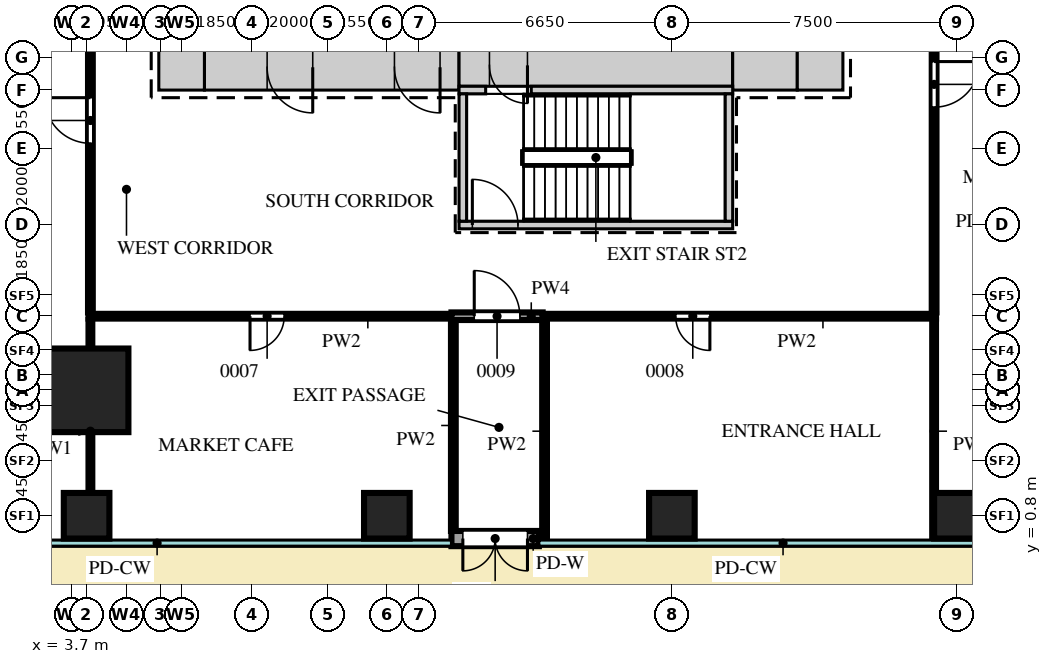
"""IFC4 building model, lengths in metres.
Left out: names, types, materials, properties, quantities, classifications, styles, units other than length and angle.
Written with IfcOpenShell. Run it as: python <this file> out.ifc"""

import sys

from ifc_helpers import new_model, si_unit, direction, frame, frame_2d, origin, origin_2d, place, context, subcontext, project, spatial, rectangle, extrude, source, transform, mapped, element, fill, save


model = new_model("IFC4")
c1 = context("Model", 3, precision=1e-05, world=origin(), true_north=direction((0.0, 1.0)))
c2 = subcontext(c1, "Body", "Model", "MODEL_VIEW")
j1 = project(units=[si_unit("LENGTHUNIT", "METRE"), si_unit("PLANEANGLEUNIT", "RADIAN")], contexts=[c1])
p1 = place(None, origin())
s1 = spatial("IfcSite", under=j1, at=p1, CompositionType="ELEMENT")
p2 = place(p1, origin())
s2 = spatial("IfcBuilding", under=s1, at=p2, CompositionType="ELEMENT")
p3 = place(p2, origin())
s3 = spatial("IfcBuildingStorey", under=s2, at=p3, CompositionType="ELEMENT", Elevation=0.0)
m1 = source(origin(), c2, "Body", "SweptSolid", [
    extrude(rectangle(XDim=6.7, YDim=1.2, at=frame_2d((3.35, 0.0))), origin(), (0.0, 0.0, 1.0), 7.2),
])
p4 = place(p3, frame((7.2, 12.6, 0.0), z_axis=(0.0, 0.0, 1.0), x_axis=(1.0, 0.0, 0.0)))
e1 = element("IfcWall", 1, at=p4, inside=s3, PredefinedType="SHEAR", context=c2, shape_type="MappedRepresentation", body=[
    mapped(m1, transform((0.0, 0.0, 0.0))),
])
m2 = source(origin(), c2, "Body", "SweptSolid", [
    extrude(rectangle(XDim=1.2, YDim=2.1, at=frame_2d((0.6, 1.05))), frame((0.0, 0.61, 0.0), z_axis=(0.0, -1.0, 0.0), x_axis=(1.0, 0.0, 0.0)), (0.0, 0.0, 1.0), 1.22),
])
p5 = place(p4, frame((5.0, 0.0, 0.0)))
e2 = element("IfcOpeningElement", 2, at=p5, cuts=e1, PredefinedType="OPENING", context=c2, shape_type="MappedRepresentation", body=[
    mapped(m2, transform((0.0, 0.0, 0.0))),
])
p6 = place(p4, frame((1.65, 0.0, 0.0)))
e3 = element("IfcOpeningElement", 3, at=p6, cuts=e1, PredefinedType="OPENING", context=c2, shape_type="MappedRepresentation", body=[
    mapped(m2, transform((0.0, 0.0, 0.0))),
])
m3 = source(origin(), c2, "Body", "SweptSolid", [
    extrude(rectangle(XDim=7.2, YDim=1.1, at=frame_2d((3.6, 0.0))), origin(), (0.0, 0.0, 1.0), 7.2),
])
p7 = place(p3, frame((13.9, 12.65, 0.0), z_axis=(0.0, 0.0, 1.0), x_axis=(1.0, 0.0, 0.0)))
e4 = element("IfcWall", 4, at=p7, inside=s3, PredefinedType="SHEAR", context=c2, shape_type="MappedRepresentation", body=[
    mapped(m3, transform((0.0, 0.0, 0.0))),
])
m4 = source(origin(), c2, "Body", "SweptSolid", [
    extrude(rectangle(XDim=1.0, YDim=2.1, at=frame_2d((0.5, 1.05))), frame((0.0, 0.56, 0.0), z_axis=(0.0, -1.0, 0.0), x_axis=(1.0, 0.0, 0.0)), (0.0, 0.0, 1.0), 1.12),
])
p8 = place(p7, frame((0.8, 0.0, 0.0)))
e5 = element("IfcOpeningElement", 5, at=p8, cuts=e4, PredefinedType="OPENING", context=c2, shape_type="MappedRepresentation", body=[
    mapped(m4, transform((0.0, 0.0, 0.0))),
])
m5 = source(origin(), c2, "Body", "SweptSolid", [
    extrude(rectangle(XDim=1.7, YDim=1.2, at=frame_2d((0.85, 0.0))), origin(), (0.0, 0.0, 1.0), 7.2),
])
p9 = place(p3, frame((21.1, 12.6, 0.0), z_axis=(0.0, 0.0, 1.0), x_axis=(1.0, 0.0, 0.0)))
e6 = element("IfcWall", 6, at=p9, inside=s3, PredefinedType="SHEAR", context=c2, shape_type="MappedRepresentation", body=[
    mapped(m5, transform((0.0, 0.0, 0.0))),
])
m6 = source(origin(), c2, "Body", "SweptSolid", [
    extrude(rectangle(XDim=1.2, YDim=1.2, at=frame_2d((0.6, 0.0))), origin(), (0.0, 0.0, 1.0), 7.2),
])
for number, where, z_axis, x_axis in (
    (7, (22.8, 12.6, 0.0), (0.0, 0.0, 1.0), (1.0, 0.0, 0.0)),
    (8, (6.0, 12.6, 0.0), (0.0, 0.0, 1.0), (1.0, 0.0, 0.0)),
):
    element("IfcWall", number, at=place(p3, frame(where, z_axis=z_axis, x_axis=x_axis)), inside=s3, PredefinedType="SHEAR", context=c2, shape_type="MappedRepresentation", body=[
        mapped(m6, transform((0.0, 0.0, 0.0))),
    ])
m7 = source(origin(), c2, "Body", "SweptSolid", [
    extrude(rectangle(XDim=0.7, YDim=0.2, at=frame_2d((0.35, 0.0))), origin(), (0.0, 0.0, 1.0), 7.2),
])
p10 = place(p3, frame((13.9, 12.0, 0.0), z_axis=(0.0, 0.0, 1.0), x_axis=(1.0, 0.0, 0.0)))
e9 = element("IfcWall", 9, at=p10, inside=s3, PredefinedType="SHEAR", context=c2, shape_type="MappedRepresentation", body=[
    mapped(m7, transform((0.0, 0.0, 0.0))),
])
m8 = source(origin(), c2, "Body", "SweptSolid", [
    extrude(rectangle(XDim=5.3, YDim=0.2, at=frame_2d((2.65, 0.0))), origin(), (0.0, 0.0, 1.0), 7.2),
])
p11 = place(p3, frame((15.8, 12.0, 0.0), z_axis=(0.0, 0.0, 1.0), x_axis=(1.0, 0.0, 0.0)))
e10 = element("IfcWall", 10, at=p11, inside=s3, PredefinedType="SHEAR", context=c2, shape_type="MappedRepresentation", body=[
    mapped(m8, transform((0.0, 0.0, 0.0))),
])
m9 = source(origin(), c2, "Body", "SweptSolid", [
    extrude(rectangle(XDim=7.2, YDim=0.2, at=frame_2d((3.6, 0.0))), origin(), (0.0, 0.0, 1.0), 7.2),
])
p12 = place(p3, frame((13.9, 8.45, 0.0), z_axis=(0.0, 0.0, 1.0), x_axis=(1.0, 0.0, 0.0)))
e11 = element("IfcWall", 11, at=p12, inside=s3, PredefinedType="SHEAR", context=c2, shape_type="MappedRepresentation", body=[
    mapped(m9, transform((0.0, 0.0, 0.0))),
])
m10 = source(origin(), c2, "Body", "SweptSolid", [
    extrude(rectangle(XDim=1.2, YDim=2.1, at=frame_2d((0.6, 1.05))), frame((0.0, 0.11, 0.0), z_axis=(0.0, -1.0, 0.0), x_axis=(1.0, 0.0, 0.0)), (0.0, 0.0, 1.0), 0.22),
])
p13 = place(p12, frame((0.35, 0.0, 0.0)))
e12 = element("IfcOpeningElement", 12, at=p13, cuts=e11, PredefinedType="OPENING", context=c2, shape_type="MappedRepresentation", body=[
    mapped(m10, transform((0.0, 0.0, 0.0))),
])
m11 = source(origin(), c2, "Body", "SweptSolid", [
    extrude(rectangle(XDim=3.35, YDim=0.2, at=frame_2d((1.675, 0.0))), origin(), (0.0, 0.0, 1.0), 7.2),
])
for number, where, z_axis, x_axis in (
    (13, (21.0, 8.55, 0.0), (0.0, 0.0, 1.0), (0.0, 1.0, 0.0)),
    (14, (14.0, 8.55, 0.0), (0.0, 0.0, 1.0), (0.0, 1.0, 0.0)),
):
    element("IfcWall", number, at=place(p3, frame(where, z_axis=z_axis, x_axis=x_axis)), inside=s3, PredefinedType="SHEAR", context=c2, shape_type="MappedRepresentation", body=[
        mapped(m11, transform((0.0, 0.0, 0.0))),
    ])
m12 = source(origin(), c2, "Body", "SweptSolid", [
    extrude(rectangle(XDim=2.2, YDim=2.2, at=origin_2d()), origin(), (0.0, 0.0, 1.0), 7.2),
])
p14 = place(p3, frame((4.1, 4.1, 0.0), z_axis=(0.0, 0.0, 1.0), x_axis=(1.0, 0.0, 0.0)))
e15 = element("IfcColumn", 15, at=p14, inside=s3, PredefinedType="COLUMN", context=c2, shape_type="MappedRepresentation", body=[
    mapped(m12, transform((0.0, 0.0, 0.0))),
])
m13 = source(origin(), c2, "Body", "SweptSolid", [
    extrude(rectangle(XDim=1.2, YDim=1.2, at=origin_2d()), origin(), (0.0, 0.0, 1.0), 7.2),
])
for number, where, z_axis, x_axis in (
    (16, (4.1, 0.8, 0.0), (0.0, 0.0, 1.0), (1.0, 0.0, 0.0)),
    (17, (12.0, 0.8, 0.0), (0.0, 0.0, 1.0), (1.0, 0.0, 0.0)),
    (18, (19.5, 0.8, 0.0), (0.0, 0.0, 1.0), (1.0, 0.0, 0.0)),
    (19, (27.0, 0.8, 0.0), (0.0, 0.0, 1.0), (1.0, 0.0, 0.0)),
):
    element("IfcColumn", number, at=place(p3, frame(where, z_axis=z_axis, x_axis=x_axis)), inside=s3, PredefinedType="COLUMN", context=c2, shape_type="MappedRepresentation", body=[
        mapped(m13, transform((0.0, 0.0, 0.0))),
    ])
m14 = source(origin(), c2, "Body", "SweptSolid", [
    extrude(rectangle(XDim=2.3, YDim=0.4, at=frame_2d((1.15, 0.0))), origin(), (0.0, 0.0, 1.0), 7.15),
])
p15 = place(p3, frame((13.7, 0.2, 0.0), z_axis=(0.0, 0.0, 1.0), x_axis=(1.0, 0.0, 0.0)))
e20 = element("IfcWall", 20, at=p15, inside=s3, PredefinedType="SOLIDWALL", context=c2, shape_type="MappedRepresentation", body=[
    mapped(m14, transform((0.0, 0.0, 0.0))),
])
m15 = source(origin(), c2, "Body", "SweptSolid", [
    extrude(rectangle(XDim=1.7, YDim=2.4, at=frame_2d((0.85, 1.2))), frame((0.0, 0.21, 0.0), z_axis=(0.0, -1.0, 0.0), x_axis=(1.0, 0.0, 0.0)), (0.0, 0.0, 1.0), 0.42),
])
p16 = place(p15, frame((2.0, 0.0, 0.0), z_axis=(0.0, 0.0, 1.0), x_axis=(-1.0, 0.0, 0.0)))
e21 = element("IfcOpeningElement", 21, at=p16, cuts=e20, PredefinedType="OPENING", context=c2, shape_type="MappedRepresentation", body=[
    mapped(m15, transform((0.0, 0.0, 0.0))),
])
m16 = source(origin(), c2, "Body", "SweptSolid", [
    extrude(rectangle(XDim=5.85, YDim=0.1, at=frame_2d((2.925, 0.0))), origin(), (0.0, 0.0, 1.0), 7.2),
])
p17 = place(p3, frame((4.2, 0.1, 0.0), z_axis=(0.0, 0.0, 1.0), x_axis=(0.0, 1.0, 0.0)))
e22 = element("IfcWall", 22, at=p17, inside=s3, PredefinedType="PARTITIONING", context=c2, shape_type="MappedRepresentation", body=[
    mapped(m16, transform((0.0, 0.0, 0.0))),
])
m17 = source(origin(), c2, "Body", "SweptSolid", [
    extrude(rectangle(XDim=5.55, YDim=0.125, at=frame_2d((2.775, 0.0))), origin(), (0.0, 0.0, 1.0), 7.2),
])
p18 = place(p3, frame((13.75, 0.4, 0.0), z_axis=(0.0, 0.0, 1.0), x_axis=(0.0, 1.0, 0.0)))
e23 = element("IfcWall", 23, at=p18, inside=s3, PredefinedType="PARTITIONING", context=c2, shape_type="MappedRepresentation", body=[
    mapped(m17, transform((0.0, 0.0, 0.0))),
])
m18 = source(origin(), c2, "Body", "SweptSolid", [
    extrude(rectangle(XDim=5.85, YDim=0.125, at=frame_2d((2.925, 0.0))), origin(), (0.0, 0.0, 1.0), 7.2),
])
p19 = place(p3, frame((16.15, 0.1, 0.0), z_axis=(0.0, 0.0, 1.0), x_axis=(0.0, 1.0, 0.0)))
e24 = element("IfcWall", 24, at=p19, inside=s3, PredefinedType="PARTITIONING", context=c2, shape_type="MappedRepresentation", body=[
    mapped(m18, transform((0.0, 0.0, 0.0))),
])
p20 = place(p3, frame((26.4, 0.1, 0.0), z_axis=(0.0, 0.0, 1.0), x_axis=(0.0, 1.0, 0.0)))
e25 = element("IfcWall", 25, at=p20, inside=s3, PredefinedType="PARTITIONING", context=c2, shape_type="MappedRepresentation", body=[
    mapped(m16, transform((0.0, 0.0, 0.0))),
])
m19 = source(origin(), c2, "Body", "SweptSolid", [
    extrude(rectangle(XDim=9.55, YDim=0.125, at=frame_2d((4.775, 0.0))), origin(), (0.0, 0.0, 1.0), 7.2),
])
p21 = place(p3, frame((4.15, 6.05, 0.0), z_axis=(0.0, 0.0, 1.0), x_axis=(1.0, 0.0, 0.0)))
e26 = element("IfcWall", 26, at=p21, inside=s3, PredefinedType="PARTITIONING", context=c2, shape_type="MappedRepresentation", body=[
    mapped(m19, transform((0.0, 0.0, 0.0))),
])
m20 = source(origin(), c2, "Body", "SweptSolid", [
    extrude(rectangle(XDim=0.9, YDim=2.1, at=frame_2d((0.45, 1.05))), frame((0.0, 0.073, 0.0), z_axis=(0.0, -1.0, 0.0), x_axis=(1.0, 0.0, 0.0)), (0.0, 0.0, 1.0), 0.145),
])
p22 = place(p21, frame((4.25, 0.0, 0.0)))
e27 = element("IfcOpeningElement", 27, at=p22, cuts=e26, PredefinedType="OPENING", context=c2, shape_type="MappedRepresentation", body=[
    mapped(m20, transform((0.0, 0.0, 0.0))),
])
m21 = source(origin(), c2, "Body", "SweptSolid", [
    extrude(rectangle(XDim=2.4, YDim=0.2, at=frame_2d((1.2, 0.0))), origin(), (0.0, 0.0, 1.0), 7.2),
])
p23 = place(p3, frame((13.7, 6.05, 0.0), z_axis=(0.0, 0.0, 1.0), x_axis=(1.0, 0.0, 0.0)))
e28 = element("IfcWall", 28, at=p23, inside=s3, PredefinedType="PARTITIONING", context=c2, shape_type="MappedRepresentation", body=[
    mapped(m21, transform((0.0, 0.0, 0.0))),
])
p24 = place(p23, frame((0.6, 0.0, 0.0)))
e29 = element("IfcOpeningElement", 29, at=p24, cuts=e28, PredefinedType="OPENING", context=c2, shape_type="MappedRepresentation", body=[
    mapped(m10, transform((0.0, 0.0, 0.0))),
])
m22 = source(origin(), c2, "Body", "SweptSolid", [
    extrude(rectangle(XDim=10.35, YDim=0.125, at=frame_2d((5.175, 0.0))), origin(), (0.0, 0.0, 1.0), 7.2),
])
p25 = place(p3, frame((16.1, 6.05, 0.0), z_axis=(0.0, 0.0, 1.0), x_axis=(1.0, 0.0, 0.0)))
e30 = element("IfcWall", 30, at=p25, inside=s3, PredefinedType="PARTITIONING", context=c2, shape_type="MappedRepresentation", body=[
    mapped(m22, transform((0.0, 0.0, 0.0))),
])
p26 = place(p25, frame((3.5, 0.0, 0.0)))
e31 = element("IfcOpeningElement", 31, at=p26, cuts=e30, PredefinedType="OPENING", context=c2, shape_type="MappedRepresentation", body=[
    mapped(m20, transform((0.0, 0.0, 0.0))),
])
m23 = source(origin(), c2, "Body", "SweptSolid", [
    extrude(rectangle(XDim=41.8, YDim=0.125, at=frame_2d((20.9, 0.0))), origin(), (0.0, 0.0, 1.0), 7.2),
])
p27 = place(p3, frame((4.2, 6.15, 0.0), z_axis=(0.0, 0.0, 1.0), x_axis=(0.0, 1.0, 0.0)))
e32 = element("IfcWall", 32, at=p27, inside=s3, PredefinedType="PARTITIONING", context=c2, shape_type="MappedRepresentation", body=[
    mapped(m23, transform((0.0, 0.0, 0.0))),
])
m24 = source(origin(), c2, "Body", "SweptSolid", [
    extrude(rectangle(XDim=1.2, YDim=2.1, at=frame_2d((0.6, 1.05))), frame((0.0, 0.073, 0.0), z_axis=(0.0, -1.0, 0.0), x_axis=(1.0, 0.0, 0.0)), (0.0, 0.0, 1.0), 0.145),
])
p28 = place(p27, frame((4.45, 0.0, 0.0)))
e33 = element("IfcOpeningElement", 33, at=p28, cuts=e32, PredefinedType="OPENING", context=c2, shape_type="MappedRepresentation", body=[
    mapped(m24, transform((0.0, 0.0, 0.0))),
])
p29 = place(p27, frame((10.25, 0.0, 0.0)))
e34 = element("IfcOpeningElement", 34, at=p29, cuts=e32, PredefinedType="OPENING", context=c2, shape_type="MappedRepresentation", body=[
    mapped(m20, transform((0.0, 0.0, 0.0))),
])
p30 = place(p27, frame((20.25, 0.0, 0.0)))
e35 = element("IfcOpeningElement", 35, at=p30, cuts=e32, PredefinedType="OPENING", context=c2, shape_type="MappedRepresentation", body=[
    mapped(m24, transform((0.0, 0.0, 0.0))),
])
p31 = place(p27, frame((31.25, 0.0, 0.0)))
e36 = element("IfcOpeningElement", 36, at=p31, cuts=e32, PredefinedType="OPENING", context=c2, shape_type="MappedRepresentation", body=[
    mapped(m20, transform((0.0, 0.0, 0.0))),
])
p32 = place(p27, frame((37.05, 0.0, 0.0)))
e37 = element("IfcOpeningElement", 37, at=p32, cuts=e32, PredefinedType="OPENING", context=c2, shape_type="MappedRepresentation", body=[
    mapped(m24, transform((0.0, 0.0, 0.0))),
])
m25 = source(origin(), c2, "Body", "SweptSolid", [
    extrude(rectangle(XDim=27.15, YDim=0.125, at=frame_2d((13.575, 0.0))), origin(), (0.0, 0.0, 1.0), 7.2),
])
p33 = place(p3, frame((26.4, 6.15, 0.0), z_axis=(0.0, 0.0, 1.0), x_axis=(0.0, 1.0, 0.0)))
e38 = element("IfcWall", 38, at=p33, inside=s3, PredefinedType="PARTITIONING", context=c2, shape_type="MappedRepresentation", body=[
    mapped(m25, transform((0.0, 0.0, 0.0))),
])
p34 = place(p33, frame((5.4, 0.0, 0.0)))
e39 = element("IfcOpeningElement", 39, at=p34, cuts=e38, PredefinedType="OPENING", context=c2, shape_type="MappedRepresentation", body=[
    mapped(m24, transform((0.0, 0.0, 0.0))),
])
p35 = place(p33, frame((13.25, 0.0, 0.0)))
e40 = element("IfcOpeningElement", 40, at=p35, cuts=e38, PredefinedType="OPENING", context=c2, shape_type="MappedRepresentation", body=[
    mapped(m20, transform((0.0, 0.0, 0.0))),
])
m26 = source(origin(), c2, "Body", "SweptSolid", [
    extrude(rectangle(XDim=1.7, YDim=2.4, at=frame_2d((0.85, 1.2))), frame((0.0, 0.025, 0.0), z_axis=(0.0, -1.0, 0.0), x_axis=(1.0, 0.0, 0.0)), (0.0, 0.0, 1.0), 0.05),
])
p36 = place(p16, origin())
e41 = element("IfcDoor", 41, at=p36, inside=s3, OperationType="DOUBLE_DOOR_SINGLE_SWING", PredefinedType="DOOR", context=c2, shape_type="MappedRepresentation", body=[
    mapped(m26, transform((0.0, 0.0, 0.0))),
])
fill(e21, e41)
m27 = source(origin(), c2, "Body", "SweptSolid", [
    extrude(rectangle(XDim=1.2, YDim=2.1, at=frame_2d((0.6, 1.05))), frame((0.0, 0.55, 0.0), z_axis=(0.0, -1.0, 0.0), x_axis=(1.0, 0.0, 0.0)), (0.0, 0.0, 1.0), 1.1),
])
p37 = place(p5, origin())
e42 = element("IfcDoor", 42, at=p37, inside=s3, OperationType="SINGLE_SWING_RIGHT", PredefinedType="DOOR", context=c2, shape_type="MappedRepresentation", body=[
    mapped(m27, transform((0.0, 0.0, 0.0))),
])
fill(e2, e42)
p38 = place(p6, origin())
e43 = element("IfcDoor", 43, at=p38, inside=s3, OperationType="SINGLE_SWING_RIGHT", PredefinedType="DOOR", context=c2, shape_type="MappedRepresentation", body=[
    mapped(m27, transform((0.0, 0.0, 0.0))),
])
fill(e3, e43)
m28 = source(origin(), c2, "Body", "SweptSolid", [
    extrude(rectangle(XDim=1.0, YDim=2.1, at=frame_2d((0.5, 1.05))), frame((0.0, 0.5, 0.0), z_axis=(0.0, -1.0, 0.0), x_axis=(1.0, 0.0, 0.0)), (0.0, 0.0, 1.0), 1.0),
])
p39 = place(p8, origin())
e44 = element("IfcDoor", 44, at=p39, inside=s3, OperationType="SINGLE_SWING_RIGHT", PredefinedType="DOOR", context=c2, shape_type="MappedRepresentation", body=[
    mapped(m28, transform((0.0, 0.0, 0.0))),
])
fill(e5, e44)
m29 = source(origin(), c2, "Body", "SweptSolid", [
    extrude(rectangle(XDim=1.2, YDim=2.1, at=frame_2d((0.6, 1.05))), frame((0.0, 0.025, 0.0), z_axis=(0.0, -1.0, 0.0), x_axis=(1.0, 0.0, 0.0)), (0.0, 0.0, 1.0), 0.05),
])
p40 = place(p24, origin())
e45 = element("IfcDoor", 45, at=p40, inside=s3, OperationType="SINGLE_SWING_RIGHT", PredefinedType="DOOR", context=c2, shape_type="MappedRepresentation", body=[
    mapped(m29, transform((0.0, 0.0, 0.0))),
])
fill(e29, e45)
p41 = place(p34, origin())
e46 = element("IfcDoor", 46, at=p41, inside=s3, OperationType="SINGLE_SWING_RIGHT", PredefinedType="DOOR", context=c2, shape_type="MappedRepresentation", body=[
    mapped(m29, transform((0.0, 0.0, 0.0))),
])
fill(e39, e46)
m30 = source(origin(), c2, "Body", "SweptSolid", [
    extrude(rectangle(XDim=0.9, YDim=2.1, at=frame_2d((0.45, 1.05))), frame((0.0, 0.025, 0.0), z_axis=(0.0, -1.0, 0.0), x_axis=(1.0, 0.0, 0.0)), (0.0, 0.0, 1.0), 0.05),
])
p42 = place(p22, origin())
e47 = element("IfcDoor", 47, at=p42, inside=s3, OperationType="SINGLE_SWING_LEFT", PredefinedType="DOOR", context=c2, shape_type="MappedRepresentation", body=[
    mapped(m30, transform((0.0, 0.0, 0.0))),
])
fill(e27, e47)
p43 = place(p26, origin())
e48 = element("IfcDoor", 48, at=p43, inside=s3, OperationType="SINGLE_SWING_RIGHT", PredefinedType="DOOR", context=c2, shape_type="MappedRepresentation", body=[
    mapped(m30, transform((0.0, 0.0, 0.0))),
])
fill(e31, e48)
p44 = place(p28, origin())
e49 = element("IfcDoor", 49, at=p44, inside=s3, OperationType="SINGLE_SWING_LEFT", PredefinedType="DOOR", context=c2, shape_type="MappedRepresentation", body=[
    mapped(m29, transform((0.0, 0.0, 0.0))),
])
fill(e33, e49)
p45 = place(p13, origin())
e50 = element("IfcDoor", 50, at=p45, inside=s3, OperationType="SINGLE_SWING_RIGHT", PredefinedType="DOOR", context=c2, shape_type="MappedRepresentation", body=[
    mapped(m29, transform((0.0, 0.0, 0.0))),
])
fill(e12, e50)
save(model, sys.argv[1])
